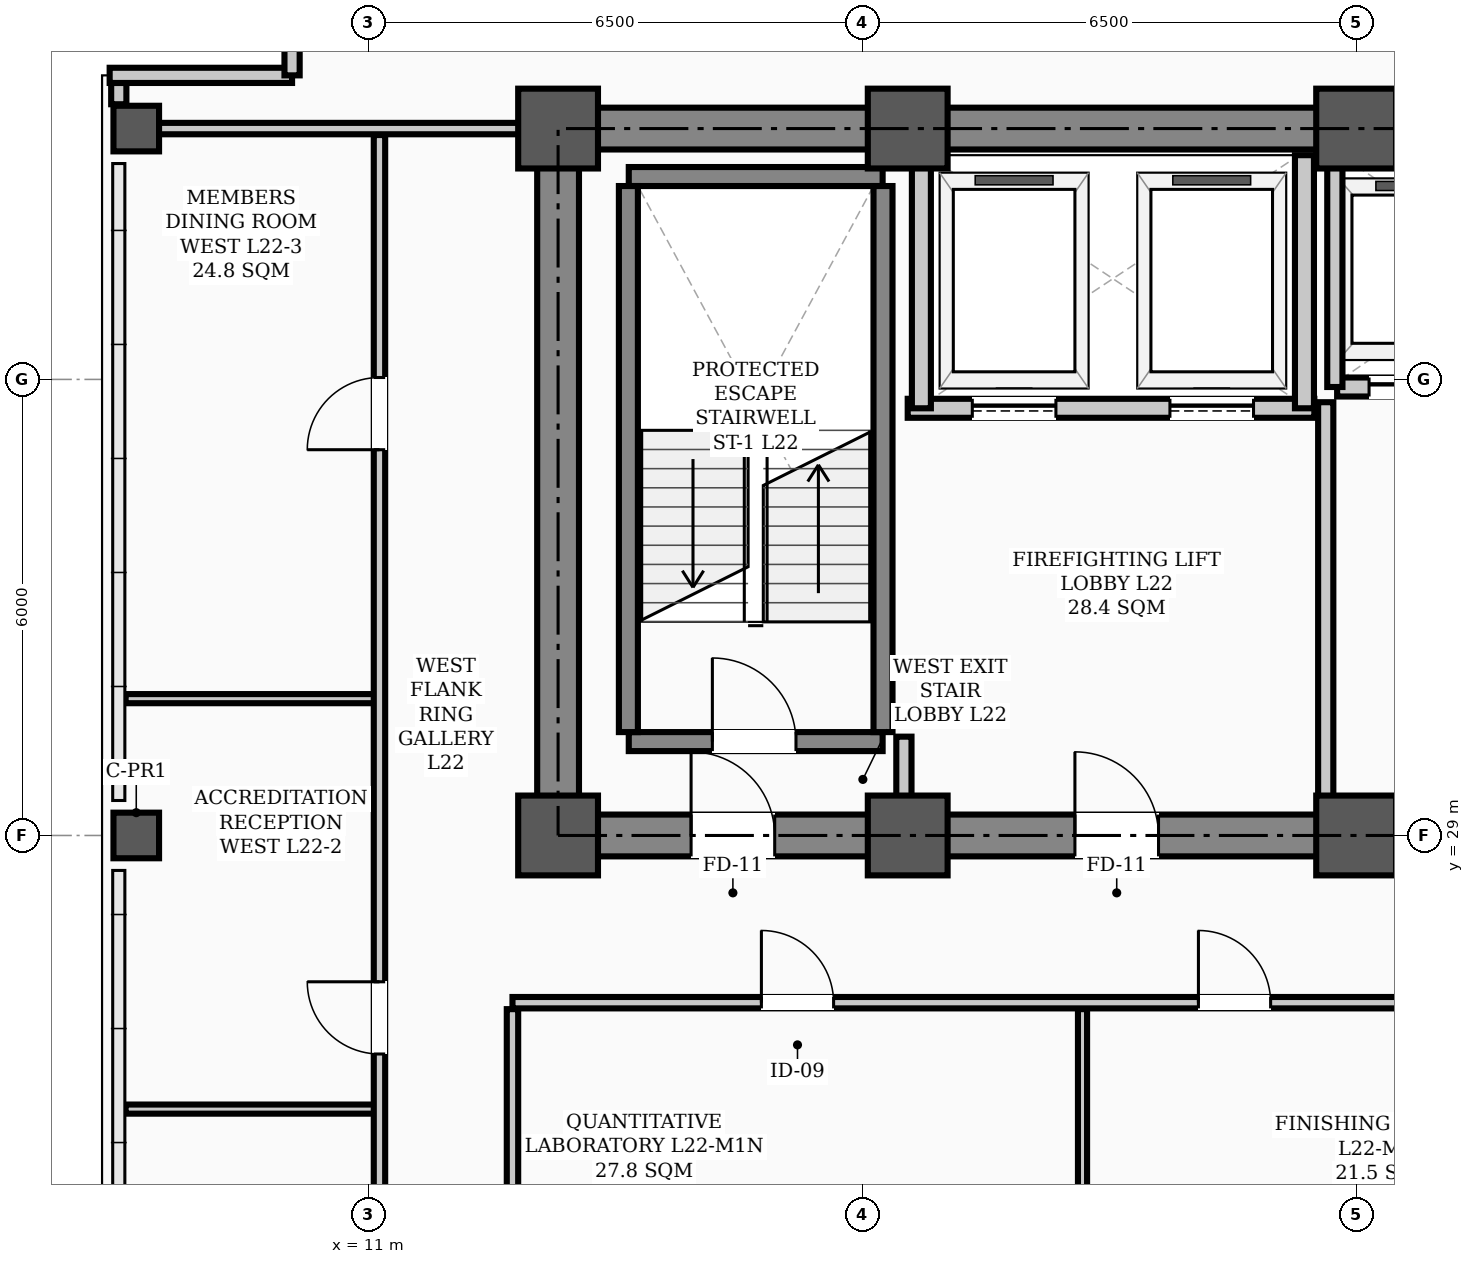
"""IFC4 building model, lengths in metres.
Left out: names, types, materials, properties, quantities, classifications, styles, units other than length and angle.
Written with IfcOpenShell. Run it as: python <this file> out.ifc"""

import sys

from ifc_helpers import new_model, si_unit, direction, frame, frame_2d, origin, origin_2d, place, context, subcontext, project, spatial, rectangle, hollow_rectangle, extrude, element, fill, save


model = new_model("IFC4")
c1 = context("Model", 3, precision=1e-05, world=origin(), true_north=direction((0.0, 1.0)))
c2 = subcontext(c1, "Body", "Model", "MODEL_VIEW")
j1 = project(units=[si_unit("LENGTHUNIT", "METRE"), si_unit("PLANEANGLEUNIT", "RADIAN")], contexts=[c1])
p1 = place(None, origin())
s1 = spatial("IfcSite", under=j1, at=p1, CompositionType="ELEMENT")
p2 = place(p1, origin())
s2 = spatial("IfcBuilding", under=s1, at=p2, CompositionType="ELEMENT")
p3 = place(p2, frame((0.0, 0.0, 88.9)))
s3 = spatial("IfcBuildingStorey", under=s2, at=p3, CompositionType="ELEMENT", Elevation=88.9)
for number, where, z_axis, x_axis in (
    (1, (13.5, 29.0, 0.0), (0.0, 0.0, 1.0), (1.0, 0.0, 0.0)),
    (2, (13.5, 38.3, 0.0), (0.0, 0.0, 1.0), (1.0, 0.0, 0.0)),
    (3, (18.1, 29.0, 0.0), (0.0, 0.0, 1.0), (1.0, 0.0, 0.0)),
    (4, (18.1, 38.3, 0.0), (0.0, 0.0, 1.0), (1.0, 0.0, 0.0)),
    (5, (24.0, 29.0, 0.0), (0.0, 0.0, 1.0), (1.0, 0.0, 0.0)),
    (6, (24.0, 38.3, 0.0), (0.0, 0.0, 1.0), (1.0, 0.0, 0.0)),
):
    element("IfcColumn", number, at=place(p3, frame(where, z_axis=z_axis, x_axis=x_axis)), inside=s3, PredefinedType="COLUMN", context=c2, shape_type="SweptSolid", body=[
        extrude(hollow_rectangle(XDim=1.05, YDim=1.05, WallThickness=0.038, InnerFilletRadius=0.019, OuterFilletRadius=0.057, at=origin_2d()), origin(), (0.0, 0.0, 1.0), 3.9),
    ])
for number, where, z_axis, x_axis in (
    (7, (7.95, 29.0, 0.0), (0.0, 0.0, 1.0), (1.0, 0.0, 0.0)),
    (8, (7.95, 38.3, 0.0), (0.0, 0.0, 1.0), (1.0, 0.0, 0.0)),
):
    element("IfcColumn", number, at=place(p3, frame(where, z_axis=z_axis, x_axis=x_axis)), inside=s3, PredefinedType="COLUMN", context=c2, shape_type="SweptSolid", body=[
        extrude(hollow_rectangle(XDim=0.6, YDim=0.6, WallThickness=0.026, InnerFilletRadius=0.013, OuterFilletRadius=0.039, at=origin_2d()), origin(), (0.0, 0.0, 1.0), 3.9),
    ])
p4 = place(p3, frame((7.72, 38.62, 0.0), z_axis=(0.0, 0.0, 1.0), x_axis=(0.0, 1.0, 0.0)))
e9 = element("IfcWall", 9, at=p4, inside=s3, PredefinedType="PARAPET", context=c2, shape_type="SweptSolid", body=[
    extrude(rectangle(XDim=0.28, YDim=0.2, at=frame_2d((0.14, 0.0))), origin(), (0.0, 0.0, 1.0), 1.2),
])
for number, where, z_axis, x_axis in (
    (10, (7.6, 39.0, 0.0), (0.0, 0.0, 1.0), (1.0, 0.0, 0.0)),
    (11, (10.0, 39.0, 0.0), (0.0, 0.0, 1.0), (0.0, 1.0, 0.0)),
):
    element("IfcWall", number, at=place(p3, frame(where, z_axis=z_axis, x_axis=x_axis)), inside=s3, PredefinedType="PARAPET", context=c2, shape_type="SweptSolid", body=[
        extrude(rectangle(XDim=2.4, YDim=0.2, at=frame_2d((1.2, 0.0))), origin(), (0.0, 0.0, 1.0), 1.2),
    ])
p5 = place(p3, frame((13.5, 29.0, 0.0), z_axis=(0.0, 0.0, 1.0), x_axis=(1.0, 0.0, 0.0)))
e12 = element("IfcWall", 12, at=p5, inside=s3, PredefinedType="SHEAR", context=c2, shape_type="SweptSolid", body=[
    extrude(rectangle(XDim=30.5, YDim=0.55, at=frame_2d((15.25, 0.0))), origin(), (0.0, 0.0, 1.0), 3.72),
])
p6 = place(p5, frame((1.75, 0.0, 0.0)))
e13 = element("IfcOpeningElement", 13, at=p6, cuts=e12, PredefinedType="OPENING", context=c2, shape_type="SweptSolid", body=[
    extrude(rectangle(XDim=1.1, YDim=2.08, at=frame_2d((0.55, 1.04))), frame((0.0, 0.285, 0.0), z_axis=(0.0, -1.0, 0.0), x_axis=(1.0, 0.0, 0.0)), (0.0, 0.0, 1.0), 0.57),
])
p7 = place(p5, frame((26.7, 0.0, 0.0)))
e14 = element("IfcOpeningElement", 14, at=p7, cuts=e12, PredefinedType="OPENING", context=c2, shape_type="SweptSolid", body=[
    extrude(rectangle(XDim=1.1, YDim=2.08, at=frame_2d((0.55, 1.04))), frame((0.0, 0.285, 0.0), z_axis=(0.0, -1.0, 0.0), x_axis=(1.0, 0.0, 0.0)), (0.0, 0.0, 1.0), 0.57),
])
p8 = place(p5, frame((6.8, 0.0, 0.0)))
e15 = element("IfcOpeningElement", 15, at=p8, cuts=e12, PredefinedType="OPENING", context=c2, shape_type="SweptSolid", body=[
    extrude(rectangle(XDim=1.1, YDim=2.08, at=frame_2d((0.55, 1.04))), frame((0.0, 0.285, 0.0), z_axis=(0.0, -1.0, 0.0), x_axis=(1.0, 0.0, 0.0)), (0.0, 0.0, 1.0), 0.57),
])
p9 = place(p5, frame((13.2, 0.0, 0.0)))
e16 = element("IfcOpeningElement", 16, at=p9, cuts=e12, PredefinedType="OPENING", context=c2, shape_type="SweptSolid", body=[
    extrude(rectangle(XDim=1.6, YDim=2.08, at=frame_2d((0.8, 1.04))), frame((0.0, 0.285, 0.0), z_axis=(0.0, -1.0, 0.0), x_axis=(1.0, 0.0, 0.0)), (0.0, 0.0, 1.0), 0.57),
])
p10 = place(p5, frame((20.525, 0.0, 0.0)))
e17 = element("IfcOpeningElement", 17, at=p10, cuts=e12, PredefinedType="OPENING", context=c2, shape_type="SweptSolid", body=[
    extrude(rectangle(XDim=0.95, YDim=2.08, at=frame_2d((0.475, 1.04))), frame((0.0, 0.285, 0.0), z_axis=(0.0, -1.0, 0.0), x_axis=(1.0, 0.0, 0.0)), (0.0, 0.0, 1.0), 0.57),
])
p11 = place(p3, frame((13.5, 38.3, 0.0), z_axis=(0.0, 0.0, 1.0), x_axis=(1.0, 0.0, 0.0)))
e18 = element("IfcWall", 18, at=p11, inside=s3, PredefinedType="SHEAR", context=c2, shape_type="SweptSolid", body=[
    extrude(rectangle(XDim=30.5, YDim=0.55, at=frame_2d((15.25, 0.0))), origin(), (0.0, 0.0, 1.0), 3.72),
])
p12 = place(p3, frame((13.5, 29.35, 0.0), z_axis=(0.0, 0.0, 1.0), x_axis=(0.0, 1.0, 0.0)))
e19 = element("IfcWall", 19, at=p12, inside=s3, PredefinedType="SHEAR", context=c2, shape_type="SweptSolid", body=[
    extrude(rectangle(XDim=8.6, YDim=0.55, at=frame_2d((4.3, 0.0))), origin(), (0.0, 0.0, 1.0), 3.72),
])
p13 = place(p3, frame((14.43, 30.235, 0.0), z_axis=(0.0, 0.0, 1.0), x_axis=(1.0, 0.0, 0.0)))
e20 = element("IfcWall", 20, at=p13, inside=s3, PredefinedType="STANDARD", context=c2, shape_type="SweptSolid", body=[
    extrude(rectangle(XDim=3.34, YDim=0.25, at=frame_2d((1.67, 0.0))), origin(), (0.0, 0.0, 1.0), 3.72),
])
p14 = place(p13, frame((1.1, 0.0, 0.0)))
e21 = element("IfcOpeningElement", 21, at=p14, cuts=e20, PredefinedType="OPENING", context=c2, shape_type="SweptSolid", body=[
    extrude(rectangle(XDim=1.1, YDim=2.08, at=frame_2d((0.55, 1.04))), frame((0.0, 0.135, 0.0), z_axis=(0.0, -1.0, 0.0), x_axis=(1.0, 0.0, 0.0)), (0.0, 0.0, 1.0), 0.27),
])
p15 = place(p3, frame((14.43, 37.669, 0.0), z_axis=(0.0, 0.0, 1.0), x_axis=(1.0, 0.0, 0.0)))
e22 = element("IfcWall", 22, at=p15, inside=s3, PredefinedType="STANDARD", context=c2, shape_type="SweptSolid", body=[
    extrude(rectangle(XDim=3.34, YDim=0.25, at=frame_2d((1.67, 0.0))), origin(), (0.0, 0.0, 1.0), 3.72),
])
for number, where, z_axis, x_axis in (
    (23, (14.425, 30.36, 0.0), (0.0, 0.0, 1.0), (0.0, 1.0, 0.0)),
    (24, (17.775, 30.36, 0.0), (0.0, 0.0, 1.0), (0.0, 1.0, 0.0)),
):
    element("IfcWall", number, at=place(p3, frame(where, z_axis=z_axis, x_axis=x_axis)), inside=s3, PredefinedType="STANDARD", context=c2, shape_type="SweptSolid", body=[
        extrude(rectangle(XDim=7.184, YDim=0.25, at=frame_2d((3.592, 0.0))), origin(), (0.0, 0.0, 1.0), 3.72),
    ])
p16 = place(p3, frame((18.1, 34.62, 0.0), z_axis=(0.0, 0.0, 1.0), x_axis=(1.0, 0.0, 0.0)))
e25 = element("IfcWall", 25, at=p16, inside=s3, PredefinedType="STANDARD", context=c2, shape_type="SweptSolid", body=[
    extrude(rectangle(XDim=5.35, YDim=0.25, at=frame_2d((2.675, 0.0))), origin(), (0.0, 0.0, 1.0), 3.72),
])
p17 = place(p16, frame((0.85, 0.0, 0.0)))
e26 = element("IfcOpeningElement", 26, at=p17, cuts=e25, PredefinedType="OPENING", context=c2, shape_type="SweptSolid", body=[
    extrude(rectangle(XDim=1.1, YDim=2.08, at=frame_2d((0.55, 1.04))), frame((0.0, 0.135, 0.0), z_axis=(0.0, -1.0, 0.0), x_axis=(1.0, 0.0, 0.0)), (0.0, 0.0, 1.0), 0.27),
])
p18 = place(p16, frame((3.45, 0.0, 0.0)))
e27 = element("IfcOpeningElement", 27, at=p18, cuts=e25, PredefinedType="OPENING", context=c2, shape_type="SweptSolid", body=[
    extrude(rectangle(XDim=1.1, YDim=2.08, at=frame_2d((0.55, 1.04))), frame((0.0, 0.135, 0.0), z_axis=(0.0, -1.0, 0.0), x_axis=(1.0, 0.0, 0.0)), (0.0, 0.0, 1.0), 0.27),
])
for number, where, z_axis, x_axis in (
    (28, (18.28, 34.62, 0.0), (0.0, 0.0, 1.0), (0.0, 1.0, 0.0)),
    (29, (23.32, 34.62, 0.0), (0.0, 0.0, 1.0), (0.0, 1.0, 0.0)),
):
    element("IfcWall", number, at=place(p3, frame(where, z_axis=z_axis, x_axis=x_axis)), inside=s3, PredefinedType="STANDARD", context=c2, shape_type="SweptSolid", body=[
        extrude(rectangle(XDim=3.33, YDim=0.25, at=frame_2d((1.665, 0.0))), origin(), (0.0, 0.0, 1.0), 3.3),
    ])
p19 = place(p3, frame((23.75, 34.9, 0.0), z_axis=(0.0, 0.0, 1.0), x_axis=(1.0, 0.0, 0.0)))
e30 = element("IfcWall", 30, at=p19, inside=s3, PredefinedType="STANDARD", context=c2, shape_type="SweptSolid", body=[
    extrude(rectangle(XDim=4.4, YDim=0.25, at=frame_2d((2.2, 0.0))), origin(), (0.0, 0.0, 1.0), 3.72),
])
p20 = place(p19, frame((0.42, 0.0, 0.0)))
e31 = element("IfcOpeningElement", 31, at=p20, cuts=e30, PredefinedType="OPENING", context=c2, shape_type="SweptSolid", body=[
    extrude(rectangle(XDim=1.3, YDim=2.08, at=frame_2d((0.65, 1.04))), frame((0.0, 0.135, 0.0), z_axis=(0.0, -1.0, 0.0), x_axis=(1.0, 0.0, 0.0)), (0.0, 0.0, 1.0), 0.27),
])
p21 = place(p19, frame((2.68, 0.0, 0.0)))
e32 = element("IfcOpeningElement", 32, at=p21, cuts=e30, PredefinedType="OPENING", context=c2, shape_type="SweptSolid", body=[
    extrude(rectangle(XDim=1.3, YDim=2.08, at=frame_2d((0.65, 1.04))), frame((0.0, 0.135, 0.0), z_axis=(0.0, -1.0, 0.0), x_axis=(1.0, 0.0, 0.0)), (0.0, 0.0, 1.0), 0.27),
])
p22 = place(p3, frame((12.9, 26.8, 0.0), z_axis=(0.0, 0.0, 1.0), x_axis=(1.0, 0.0, 0.0)))
e33 = element("IfcWall", 33, at=p22, inside=s3, PredefinedType="PARTITIONING", context=c2, shape_type="SweptSolid", body=[
    extrude(rectangle(XDim=31.7, YDim=0.15, at=frame_2d((15.85, 0.0))), origin(), (0.0, 0.0, 1.0), 3.1),
])
p23 = place(p22, frame((13.6, 0.0, 0.0)))
e34 = element("IfcOpeningElement", 34, at=p23, cuts=e33, PredefinedType="OPENING", context=c2, shape_type="SweptSolid", body=[
    extrude(rectangle(XDim=1.6, YDim=2.08, at=frame_2d((0.8, 1.04))), frame((0.0, 0.085, 0.0), z_axis=(0.0, -1.0, 0.0), x_axis=(1.0, 0.0, 0.0)), (0.0, 0.0, 1.0), 0.17),
])
p24 = place(p22, frame((3.275, 0.0, 0.0)))
e35 = element("IfcOpeningElement", 35, at=p24, cuts=e33, PredefinedType="OPENING", context=c2, shape_type="SweptSolid", body=[
    extrude(rectangle(XDim=0.95, YDim=2.08, at=frame_2d((0.475, 1.04))), frame((0.0, 0.085, 0.0), z_axis=(0.0, -1.0, 0.0), x_axis=(1.0, 0.0, 0.0)), (0.0, 0.0, 1.0), 0.17),
])
p25 = place(p22, frame((9.025, 0.0, 0.0)))
e36 = element("IfcOpeningElement", 36, at=p25, cuts=e33, PredefinedType="OPENING", context=c2, shape_type="SweptSolid", body=[
    extrude(rectangle(XDim=0.95, YDim=2.08, at=frame_2d((0.475, 1.04))), frame((0.0, 0.085, 0.0), z_axis=(0.0, -1.0, 0.0), x_axis=(1.0, 0.0, 0.0)), (0.0, 0.0, 1.0), 0.17),
])
p26 = place(p22, frame((19.525, 0.0, 0.0)))
e37 = element("IfcOpeningElement", 37, at=p26, cuts=e33, PredefinedType="OPENING", context=c2, shape_type="SweptSolid", body=[
    extrude(rectangle(XDim=0.95, YDim=2.08, at=frame_2d((0.475, 1.04))), frame((0.0, 0.085, 0.0), z_axis=(0.0, -1.0, 0.0), x_axis=(1.0, 0.0, 0.0)), (0.0, 0.0, 1.0), 0.17),
])
p27 = place(p22, frame((26.725, 0.0, 0.0)))
e38 = element("IfcOpeningElement", 38, at=p27, cuts=e33, PredefinedType="OPENING", context=c2, shape_type="SweptSolid", body=[
    extrude(rectangle(XDim=0.95, YDim=2.08, at=frame_2d((0.475, 1.04))), frame((0.0, 0.085, 0.0), z_axis=(0.0, -1.0, 0.0), x_axis=(1.0, 0.0, 0.0)), (0.0, 0.0, 1.0), 0.17),
])
p28 = place(p3, frame((7.81, 38.3, 0.0), z_axis=(0.0, 0.0, 1.0), x_axis=(1.0, 0.0, 0.0)))
e39 = element("IfcWall", 39, at=p28, inside=s3, PredefinedType="PARTITIONING", context=c2, shape_type="SweptSolid", body=[
    extrude(rectangle(XDim=5.69, YDim=0.15, at=frame_2d((2.845, 0.0))), origin(), (0.0, 0.0, 1.0), 3.0),
])
for number, where, z_axis, x_axis in (
    (40, (7.81, 25.4, 0.0), (0.0, 0.0, 1.0), (1.0, 0.0, 0.0)),
    (41, (7.81, 30.8, 0.0), (0.0, 0.0, 1.0), (1.0, 0.0, 0.0)),
):
    element("IfcWall", number, at=place(p3, frame(where, z_axis=z_axis, x_axis=x_axis)), inside=s3, PredefinedType="PARTITIONING", context=c2, shape_type="SweptSolid", body=[
        extrude(rectangle(XDim=3.34, YDim=0.12, at=frame_2d((1.67, 0.0))), origin(), (0.0, 0.0, 1.0), 3.212),
    ])
p29 = place(p3, frame((18.05, 29.285, 0.0), z_axis=(0.0, 0.0, 1.0), x_axis=(0.0, 1.0, 0.0)))
e42 = element("IfcWall", 42, at=p29, inside=s3, PredefinedType="STANDARD", context=c2, shape_type="SweptSolid", body=[
    extrude(rectangle(XDim=1.015, YDim=0.2, at=frame_2d((0.508, 0.0))), origin(), (0.0, 0.0, 1.0), 3.3),
])
p30 = place(p3, frame((23.6, 29.285, 0.0), z_axis=(0.0, 0.0, 1.0), x_axis=(0.0, 1.0, 0.0)))
e43 = element("IfcWall", 43, at=p30, inside=s3, PredefinedType="STANDARD", context=c2, shape_type="SweptSolid", body=[
    extrude(rectangle(XDim=5.415, YDim=0.2, at=frame_2d((2.708, 0.0))), origin(), (0.0, 0.0, 1.0), 3.1),
])
p31 = place(p3, frame((11.15, 17.635, 0.0), z_axis=(0.0, 0.0, 1.0), x_axis=(0.0, 1.0, 0.0)))
e44 = element("IfcWall", 44, at=p31, inside=s3, PredefinedType="PARTITIONING", context=c2, shape_type="SweptSolid", body=[
    extrude(rectangle(XDim=20.58, YDim=0.15, at=frame_2d((10.29, 0.0))), origin(), (0.0, 0.0, 1.0), 3.0),
])
p32 = place(p31, frame((3.365, 0.0, 0.0)))
e45 = element("IfcOpeningElement", 45, at=p32, cuts=e44, PredefinedType="OPENING", context=c2, shape_type="SweptSolid", body=[
    extrude(rectangle(XDim=0.95, YDim=2.08, at=frame_2d((0.475, 1.04))), frame((0.0, 0.085, 0.0), z_axis=(0.0, -1.0, 0.0), x_axis=(1.0, 0.0, 0.0)), (0.0, 0.0, 1.0), 0.17),
])
p33 = place(p31, frame((8.49, 0.0, 0.0)))
e46 = element("IfcOpeningElement", 46, at=p33, cuts=e44, PredefinedType="OPENING", context=c2, shape_type="SweptSolid", body=[
    extrude(rectangle(XDim=0.95, YDim=2.08, at=frame_2d((0.475, 1.04))), frame((0.0, 0.085, 0.0), z_axis=(0.0, -1.0, 0.0), x_axis=(1.0, 0.0, 0.0)), (0.0, 0.0, 1.0), 0.17),
])
p34 = place(p31, frame((16.44, 0.0, 0.0)))
e47 = element("IfcOpeningElement", 47, at=p34, cuts=e44, PredefinedType="OPENING", context=c2, shape_type="SweptSolid", body=[
    extrude(rectangle(XDim=0.95, YDim=2.08, at=frame_2d((0.475, 1.04))), frame((0.0, 0.085, 0.0), z_axis=(0.0, -1.0, 0.0), x_axis=(1.0, 0.0, 0.0)), (0.0, 0.0, 1.0), 0.17),
])
p35 = place(p3, frame((12.9, 19.335, 0.0), z_axis=(0.0, 0.0, 1.0), x_axis=(0.0, 1.0, 0.0)))
e48 = element("IfcWall", 48, at=p35, inside=s3, PredefinedType="PARTITIONING", context=c2, shape_type="SweptSolid", body=[
    extrude(rectangle(XDim=7.38, YDim=0.15, at=frame_2d((3.69, 0.0))), origin(), (0.0, 0.0, 1.0), 3.0),
])
p36 = place(p3, frame((20.4, 19.335, 0.0), z_axis=(0.0, 0.0, 1.0), x_axis=(0.0, 1.0, 0.0)))
e49 = element("IfcWall", 49, at=p36, inside=s3, PredefinedType="PARTITIONING", context=c2, shape_type="SweptSolid", body=[
    extrude(rectangle(XDim=7.38, YDim=0.12, at=frame_2d((3.69, 0.0))), origin(), (0.0, 0.0, 1.0), 3.0),
])
p37 = place(p3, frame((23.72, 34.9, 0.0), z_axis=(0.0, 0.0, 1.0), x_axis=(0.0, 1.0, 0.0)))
e50 = element("IfcWall", 50, at=p37, inside=s3, PredefinedType="STANDARD", context=c2, shape_type="SweptSolid", body=[
    extrude(rectangle(XDim=3.12, YDim=0.2, at=frame_2d((1.56, 0.0))), origin(), (0.0, 0.0, 1.0), 3.1),
])
p38 = place(p14, origin())
e51 = element("IfcDoor", 51, at=p38, inside=s3, OperationType="SINGLE_SWING_LEFT", PredefinedType="DOOR", context=c2, shape_type="SweptSolid", body=[
    extrude(rectangle(XDim=1.1, YDim=2.08, at=frame_2d((0.55, 1.04))), frame((0.0, 0.025, 0.0), z_axis=(0.0, -1.0, 0.0), x_axis=(1.0, 0.0, 0.0)), (0.0, 0.0, 1.0), 0.05),
])
fill(e21, e51)
p39 = place(p6, origin())
e52 = element("IfcDoor", 52, at=p39, inside=s3, OperationType="SINGLE_SWING_LEFT", PredefinedType="DOOR", context=c2, shape_type="SweptSolid", body=[
    extrude(rectangle(XDim=1.1, YDim=2.08, at=frame_2d((0.55, 1.04))), frame((0.0, 0.025, 0.0), z_axis=(0.0, -1.0, 0.0), x_axis=(1.0, 0.0, 0.0)), (0.0, 0.0, 1.0), 0.05),
])
fill(e13, e52)
p40 = place(p8, origin())
e53 = element("IfcDoor", 53, at=p40, inside=s3, OperationType="SINGLE_SWING_LEFT", PredefinedType="DOOR", context=c2, shape_type="SweptSolid", body=[
    extrude(rectangle(XDim=1.1, YDim=2.08, at=frame_2d((0.55, 1.04))), frame((0.0, 0.025, 0.0), z_axis=(0.0, -1.0, 0.0), x_axis=(1.0, 0.0, 0.0)), (0.0, 0.0, 1.0), 0.05),
])
fill(e15, e53)
p41 = place(p24, origin())
e54 = element("IfcDoor", 54, at=p41, inside=s3, OperationType="SINGLE_SWING_LEFT", PredefinedType="DOOR", context=c2, shape_type="SweptSolid", body=[
    extrude(rectangle(XDim=0.95, YDim=2.08, at=frame_2d((0.475, 1.04))), frame((0.0, 0.025, 0.0), z_axis=(0.0, -1.0, 0.0), x_axis=(1.0, 0.0, 0.0)), (0.0, 0.0, 1.0), 0.05),
])
fill(e35, e54)
p42 = place(p25, origin())
e55 = element("IfcDoor", 55, at=p42, inside=s3, OperationType="SINGLE_SWING_LEFT", PredefinedType="DOOR", context=c2, shape_type="SweptSolid", body=[
    extrude(rectangle(XDim=0.95, YDim=2.08, at=frame_2d((0.475, 1.04))), frame((0.0, 0.025, 0.0), z_axis=(0.0, -1.0, 0.0), x_axis=(1.0, 0.0, 0.0)), (0.0, 0.0, 1.0), 0.05),
])
fill(e36, e55)
p43 = place(p33, origin())
e56 = element("IfcDoor", 56, at=p43, inside=s3, OperationType="SINGLE_SWING_RIGHT", PredefinedType="DOOR", context=c2, shape_type="SweptSolid", body=[
    extrude(rectangle(XDim=0.95, YDim=2.08, at=frame_2d((0.475, 1.04))), frame((0.0, 0.025, 0.0), z_axis=(0.0, -1.0, 0.0), x_axis=(1.0, 0.0, 0.0)), (0.0, 0.0, 1.0), 0.05),
])
fill(e46, e56)
p44 = place(p34, origin())
e57 = element("IfcDoor", 57, at=p44, inside=s3, OperationType="SINGLE_SWING_LEFT", PredefinedType="DOOR", context=c2, shape_type="SweptSolid", body=[
    extrude(rectangle(XDim=0.95, YDim=2.08, at=frame_2d((0.475, 1.04))), frame((0.0, 0.025, 0.0), z_axis=(0.0, -1.0, 0.0), x_axis=(1.0, 0.0, 0.0)), (0.0, 0.0, 1.0), 0.05),
])
fill(e47, e57)
p45 = place(p17, origin())
e58 = element("IfcDoor", 58, at=p45, inside=s3, OperationType="SLIDING_TO_LEFT", PredefinedType="DOOR", context=c2, shape_type="SweptSolid", body=[
    extrude(rectangle(XDim=1.1, YDim=2.08, at=frame_2d((0.55, 1.04))), frame((0.0, 0.025, 0.0), z_axis=(0.0, -1.0, 0.0), x_axis=(1.0, 0.0, 0.0)), (0.0, 0.0, 1.0), 0.05),
])
fill(e26, e58)
p46 = place(p18, origin())
e59 = element("IfcDoor", 59, at=p46, inside=s3, OperationType="SLIDING_TO_LEFT", PredefinedType="DOOR", context=c2, shape_type="SweptSolid", body=[
    extrude(rectangle(XDim=1.1, YDim=2.08, at=frame_2d((0.55, 1.04))), frame((0.0, 0.025, 0.0), z_axis=(0.0, -1.0, 0.0), x_axis=(1.0, 0.0, 0.0)), (0.0, 0.0, 1.0), 0.05),
])
fill(e27, e59)
p47 = place(p20, origin())
e60 = element("IfcDoor", 60, at=p47, inside=s3, OperationType="DOUBLE_DOOR_SLIDING", PredefinedType="DOOR", context=c2, shape_type="SweptSolid", body=[
    extrude(rectangle(XDim=1.3, YDim=2.08, at=frame_2d((0.65, 1.04))), frame((0.0, 0.025, 0.0), z_axis=(0.0, -1.0, 0.0), x_axis=(1.0, 0.0, 0.0)), (0.0, 0.0, 1.0), 0.05),
])
fill(e31, e60)
save(model, sys.argv[1])
